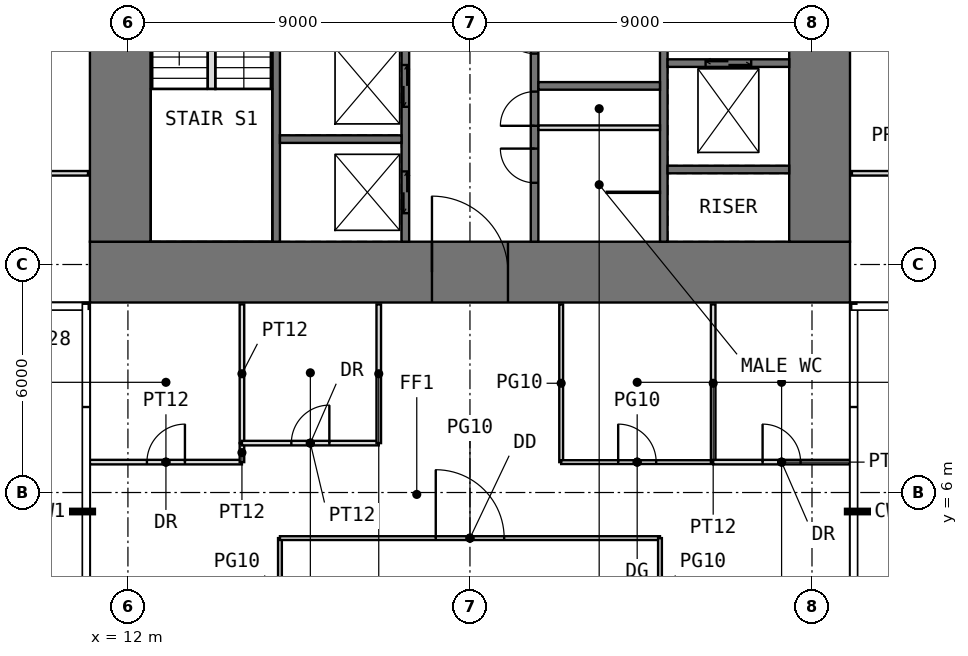
"""IFC4 building model, lengths in metres.
Left out: names, types, materials, properties, quantities, classifications, styles, units other than length and angle.
Written with IfcOpenShell. Run it as: python <this file> out.ifc"""

import sys

from ifc_helpers import new_model, si_unit, direction, frame, frame_2d, origin, place, context, subcontext, project, spatial, rectangle, extrude, element, fill, save


model = new_model("IFC4")
c1 = context("Model", 3, precision=1e-05, world=origin(), true_north=direction((0.0, 1.0)))
c2 = subcontext(c1, "Body", "Model", "MODEL_VIEW")
j1 = project(units=[si_unit("LENGTHUNIT", "METRE"), si_unit("PLANEANGLEUNIT", "RADIAN")], contexts=[c1])
p1 = place(None, origin())
s1 = spatial("IfcSite", under=j1, at=p1, CompositionType="ELEMENT")
p2 = place(p1, origin())
s2 = spatial("IfcBuilding", under=s1, at=p2, CompositionType="ELEMENT")
p3 = place(p2, frame((0.0, 0.0, 144.5)))
s3 = spatial("IfcBuildingStorey", under=s2, at=p3, CompositionType="ELEMENT", Elevation=144.5)
p4 = place(p3, frame((11.0, 11.8, -0.05), z_axis=(0.0, 0.0, 1.0), x_axis=(1.0, 0.0, 0.0)))
e1 = element("IfcWall", 1, at=p4, inside=s3, PredefinedType="SHEAR", context=c2, shape_type="SweptSolid", body=[
    extrude(rectangle(XDim=20.0, YDim=1.6, at=frame_2d((10.0, 0.0))), origin(), (0.0, 0.0, 1.0), 4.0),
])
p5 = place(p4, frame((9.0, 0.0, 0.05)))
e2 = element("IfcOpeningElement", 2, at=p5, cuts=e1, PredefinedType="OPENING", context=c2, shape_type="SweptSolid", body=[
    extrude(rectangle(XDim=2.0, YDim=2.2, at=frame_2d((1.0, 1.1))), frame((0.0, 0.81, 0.0), z_axis=(0.0, -1.0, 0.0), x_axis=(1.0, 0.0, 0.0)), (0.0, 0.0, 1.0), 1.62),
])
p6 = place(p3, frame((11.8, 12.6, -0.05), z_axis=(0.0, 0.0, 1.0), x_axis=(0.0, 1.0, 0.0)))
e3 = element("IfcWall", 3, at=p6, inside=s3, PredefinedType="SHEAR", context=c2, shape_type="SweptSolid", body=[
    extrude(rectangle(XDim=16.8, YDim=1.6, at=frame_2d((8.4, 0.0))), origin(), (0.0, 0.0, 1.0), 4.0),
])
p7 = place(p6, frame((9.9, 0.0, 0.05)))
e4 = element("IfcOpeningElement", 4, at=p7, cuts=e3, PredefinedType="OPENING", context=c2, shape_type="SweptSolid", body=[
    extrude(rectangle(XDim=1.0, YDim=2.2, at=frame_2d((0.5, 1.1))), frame((0.0, 0.81, 0.0), z_axis=(0.0, -1.0, 0.0), x_axis=(1.0, 0.0, 0.0)), (0.0, 0.0, 1.0), 1.62),
])
p8 = place(p3, frame((30.2, 12.6, -0.05), z_axis=(0.0, 0.0, 1.0), x_axis=(0.0, 1.0, 0.0)))
e5 = element("IfcWall", 5, at=p8, inside=s3, PredefinedType="SHEAR", context=c2, shape_type="SweptSolid", body=[
    extrude(rectangle(XDim=16.8, YDim=1.6, at=frame_2d((8.4, 0.0))), origin(), (0.0, 0.0, 1.0), 4.0),
])
p9 = place(p8, frame((5.9, 0.0, 0.05)))
e6 = element("IfcOpeningElement", 6, at=p9, cuts=e5, PredefinedType="OPENING", context=c2, shape_type="SweptSolid", body=[
    extrude(rectangle(XDim=1.0, YDim=2.2, at=frame_2d((0.5, 1.1))), frame((0.0, 0.81, 0.0), z_axis=(0.0, -1.0, 0.0), x_axis=(1.0, 0.0, 0.0)), (0.0, 0.0, 1.0), 1.62),
])
p10 = place(p3, frame((15.9, 12.6, -0.05), z_axis=(0.0, 0.0, 1.0), x_axis=(0.0, 1.0, 0.0)))
e7 = element("IfcWall", 7, at=p10, inside=s3, PredefinedType="SHEAR", context=c2, shape_type="SweptSolid", body=[
    extrude(rectangle(XDim=16.8, YDim=0.2, at=frame_2d((8.4, 0.0))), origin(), (0.0, 0.0, 1.0), 4.0),
])
p11 = place(p10, frame((8.9, 0.0, 0.05)))
e8 = element("IfcOpeningElement", 8, at=p11, cuts=e7, PredefinedType="OPENING", context=c2, shape_type="SweptSolid", body=[
    extrude(rectangle(XDim=1.0, YDim=2.2, at=frame_2d((0.5, 1.1))), frame((0.0, 0.11, 0.0), z_axis=(0.0, -1.0, 0.0), x_axis=(1.0, 0.0, 0.0)), (0.0, 0.0, 1.0), 0.22),
])
p12 = place(p3, frame((19.3, 12.6, -0.05), z_axis=(0.0, 0.0, 1.0), x_axis=(0.0, 1.0, 0.0)))
e9 = element("IfcWall", 9, at=p12, inside=s3, PredefinedType="SHEAR", context=c2, shape_type="SweptSolid", body=[
    extrude(rectangle(XDim=16.8, YDim=0.2, at=frame_2d((8.4, 0.0))), origin(), (0.0, 0.0, 1.0), 4.0),
])
p13 = place(p12, frame((8.7, 0.0, 0.05)))
e10 = element("IfcOpeningElement", 10, at=p13, cuts=e9, PredefinedType="OPENING", context=c2, shape_type="SweptSolid", body=[
    extrude(rectangle(XDim=1.0, YDim=2.2, at=frame_2d((0.5, 1.1))), frame((0.0, 0.11, 0.0), z_axis=(0.0, -1.0, 0.0), x_axis=(1.0, 0.0, 0.0)), (0.0, 0.0, 1.0), 0.22),
])
p14 = place(p12, frame((10.85, 0.0, 0.05)))
e11 = element("IfcOpeningElement", 11, at=p14, cuts=e9, PredefinedType="OPENING", context=c2, shape_type="SweptSolid", body=[
    extrude(rectangle(XDim=0.9, YDim=2.2, at=frame_2d((0.45, 1.1))), frame((0.0, 0.11, 0.0), z_axis=(0.0, -1.0, 0.0), x_axis=(1.0, 0.0, 0.0)), (0.0, 0.0, 1.0), 0.22),
])
p15 = place(p12, frame((13.3, 0.0, 0.05)))
e12 = element("IfcOpeningElement", 12, at=p15, cuts=e9, PredefinedType="OPENING", context=c2, shape_type="SweptSolid", body=[
    extrude(rectangle(XDim=1.0, YDim=2.2, at=frame_2d((0.5, 1.1))), frame((0.0, 0.11, 0.0), z_axis=(0.0, -1.0, 0.0), x_axis=(1.0, 0.0, 0.0)), (0.0, 0.0, 1.0), 0.22),
])
p16 = place(p12, frame((15.55, 0.0, 0.05)))
e13 = element("IfcOpeningElement", 13, at=p16, cuts=e9, PredefinedType="OPENING", context=c2, shape_type="SweptSolid", body=[
    extrude(rectangle(XDim=0.9, YDim=2.2, at=frame_2d((0.45, 1.1))), frame((0.0, 0.11, 0.0), z_axis=(0.0, -1.0, 0.0), x_axis=(1.0, 0.0, 0.0)), (0.0, 0.0, 1.0), 0.22),
])
p17 = place(p12, frame((0.75, 0.0, 0.05)))
e14 = element("IfcOpeningElement", 14, at=p17, cuts=e9, PredefinedType="OPENING", context=c2, shape_type="SweptSolid", body=[
    extrude(rectangle(XDim=1.1, YDim=2.2, at=frame_2d((0.55, 1.1))), frame((0.0, 0.11, 0.0), z_axis=(0.0, -1.0, 0.0), x_axis=(1.0, 0.0, 0.0)), (0.0, 0.0, 1.0), 0.22),
])
p18 = place(p12, frame((3.55, 0.0, 0.05)))
e15 = element("IfcOpeningElement", 15, at=p18, cuts=e9, PredefinedType="OPENING", context=c2, shape_type="SweptSolid", body=[
    extrude(rectangle(XDim=1.1, YDim=2.2, at=frame_2d((0.55, 1.1))), frame((0.0, 0.11, 0.0), z_axis=(0.0, -1.0, 0.0), x_axis=(1.0, 0.0, 0.0)), (0.0, 0.0, 1.0), 0.22),
])
p19 = place(p12, frame((6.35, 0.0, 0.05)))
e16 = element("IfcOpeningElement", 16, at=p19, cuts=e9, PredefinedType="OPENING", context=c2, shape_type="SweptSolid", body=[
    extrude(rectangle(XDim=1.1, YDim=2.2, at=frame_2d((0.55, 1.1))), frame((0.0, 0.11, 0.0), z_axis=(0.0, -1.0, 0.0), x_axis=(1.0, 0.0, 0.0)), (0.0, 0.0, 1.0), 0.22),
])
p20 = place(p3, frame((22.7, 12.6, -0.05), z_axis=(0.0, 0.0, 1.0), x_axis=(0.0, 1.0, 0.0)))
e17 = element("IfcWall", 17, at=p20, inside=s3, PredefinedType="SHEAR", context=c2, shape_type="SweptSolid", body=[
    extrude(rectangle(XDim=16.8, YDim=0.2, at=frame_2d((8.4, 0.0))), origin(), (0.0, 0.0, 1.0), 4.0),
])
p21 = place(p20, frame((3.05, 0.0, 0.05)))
e18 = element("IfcOpeningElement", 18, at=p21, cuts=e17, PredefinedType="OPENING", context=c2, shape_type="SweptSolid", body=[
    extrude(rectangle(XDim=0.9, YDim=2.2, at=frame_2d((0.45, 1.1))), frame((0.0, 0.11, 0.0), z_axis=(0.0, -1.0, 0.0), x_axis=(1.0, 0.0, 0.0)), (0.0, 0.0, 1.0), 0.22),
])
p22 = place(p20, frame((7.1, 0.0, 0.05)))
e19 = element("IfcOpeningElement", 19, at=p22, cuts=e17, PredefinedType="OPENING", context=c2, shape_type="SweptSolid", body=[
    extrude(rectangle(XDim=1.0, YDim=2.2, at=frame_2d((0.5, 1.1))), frame((0.0, 0.11, 0.0), z_axis=(0.0, -1.0, 0.0), x_axis=(1.0, 0.0, 0.0)), (0.0, 0.0, 1.0), 0.22),
])
p23 = place(p20, frame((1.55, 0.0, 0.05)))
e20 = element("IfcOpeningElement", 20, at=p23, cuts=e17, PredefinedType="OPENING", context=c2, shape_type="SweptSolid", body=[
    extrude(rectangle(XDim=0.9, YDim=2.2, at=frame_2d((0.45, 1.1))), frame((0.0, 0.11, 0.0), z_axis=(0.0, -1.0, 0.0), x_axis=(1.0, 0.0, 0.0)), (0.0, 0.0, 1.0), 0.22),
])
p24 = place(p20, frame((4.95, 0.0, 0.05)))
e21 = element("IfcOpeningElement", 21, at=p24, cuts=e17, PredefinedType="OPENING", context=c2, shape_type="SweptSolid", body=[
    extrude(rectangle(XDim=0.9, YDim=2.2, at=frame_2d((0.45, 1.1))), frame((0.0, 0.11, 0.0), z_axis=(0.0, -1.0, 0.0), x_axis=(1.0, 0.0, 0.0)), (0.0, 0.0, 1.0), 0.22),
])
p25 = place(p20, frame((9.4, 0.0, 0.05)))
e22 = element("IfcOpeningElement", 22, at=p25, cuts=e17, PredefinedType="OPENING", context=c2, shape_type="SweptSolid", body=[
    extrude(rectangle(XDim=1.0, YDim=2.2, at=frame_2d((0.5, 1.1))), frame((0.0, 0.11, 0.0), z_axis=(0.0, -1.0, 0.0), x_axis=(1.0, 0.0, 0.0)), (0.0, 0.0, 1.0), 0.22),
])
p26 = place(p3, frame((26.1, 12.6, -0.05), z_axis=(0.0, 0.0, 1.0), x_axis=(0.0, 1.0, 0.0)))
e23 = element("IfcWall", 23, at=p26, inside=s3, PredefinedType="SHEAR", context=c2, shape_type="SweptSolid", body=[
    extrude(rectangle(XDim=16.8, YDim=0.2, at=frame_2d((8.4, 0.0))), origin(), (0.0, 0.0, 1.0), 4.0),
])
p27 = place(p26, frame((6.9, 0.0, 0.05)))
e24 = element("IfcOpeningElement", 24, at=p27, cuts=e23, PredefinedType="OPENING", context=c2, shape_type="SweptSolid", body=[
    extrude(rectangle(XDim=1.0, YDim=2.2, at=frame_2d((0.5, 1.1))), frame((0.0, 0.11, 0.0), z_axis=(0.0, -1.0, 0.0), x_axis=(1.0, 0.0, 0.0)), (0.0, 0.0, 1.0), 0.22),
])
for number, where, z_axis, x_axis in (
    (25, (16.0, 15.3, -0.05), (0.0, 0.0, 1.0), (1.0, 0.0, 0.0)),
    (26, (22.8, 16.7, -0.05), (0.0, 0.0, 1.0), (1.0, 0.0, 0.0)),
    (27, (26.2, 14.5, -0.05), (0.0, 0.0, 1.0), (1.0, 0.0, 0.0)),
):
    element("IfcWall", number, at=place(p3, frame(where, z_axis=z_axis, x_axis=x_axis)), inside=s3, PredefinedType="SHEAR", context=c2, shape_type="SweptSolid", body=[
        extrude(rectangle(XDim=3.2, YDim=0.2, at=frame_2d((1.6, 0.0))), origin(), (0.0, 0.0, 1.0), 4.0),
    ])
p28 = place(p3, frame((26.2, 17.3, -0.05), z_axis=(0.0, 0.0, 1.0), x_axis=(1.0, 0.0, 0.0)))
e28 = element("IfcWall", 28, at=p28, inside=s3, PredefinedType="SHEAR", context=c2, shape_type="SweptSolid", body=[
    extrude(rectangle(XDim=3.2, YDim=0.2, at=frame_2d((1.6, 0.0))), origin(), (0.0, 0.0, 1.0), 4.0),
])
p29 = place(p28, frame((1.0, 0.0, 0.05)))
e29 = element("IfcOpeningElement", 29, at=p29, cuts=e28, PredefinedType="OPENING", context=c2, shape_type="SweptSolid", body=[
    extrude(rectangle(XDim=1.2, YDim=2.2, at=frame_2d((0.6, 1.1))), frame((0.0, 0.11, 0.0), z_axis=(0.0, -1.0, 0.0), x_axis=(1.0, 0.0, 0.0)), (0.0, 0.0, 1.0), 0.22),
])
p30 = place(p3, frame((22.8, 15.6, 0.0), z_axis=(0.0, 0.0, 1.0), x_axis=(1.0, 0.0, 0.0)))
e30 = element("IfcWall", 30, at=p30, inside=s3, PredefinedType="PARTITIONING", context=c2, shape_type="SweptSolid", body=[
    extrude(rectangle(XDim=3.2, YDim=0.12, at=frame_2d((1.6, 0.0))), origin(), (0.0, 0.0, 1.0), 3.75),
])
p31 = place(p3, frame((24.6, 13.9, 0.0), z_axis=(0.0, 0.0, 1.0), x_axis=(1.0, 0.0, 0.0)))
e31 = element("IfcWall", 31, at=p31, inside=s3, PredefinedType="PARTITIONING", context=c2, shape_type="SweptSolid", body=[
    extrude(rectangle(XDim=1.4, YDim=0.03, at=frame_2d((0.7, 0.0))), origin(), (0.0, 0.0, 1.0), 3.75),
])
p32 = place(p3, frame((6.8, 14.4, 0.0), z_axis=(0.0, 0.0, 1.0), x_axis=(1.0, 0.0, 0.0)))
e32 = element("IfcWall", 32, at=p32, inside=s3, PredefinedType="PARTITIONING", context=c2, shape_type="SweptSolid", body=[
    extrude(rectangle(XDim=4.15, YDim=0.12, at=frame_2d((2.075, 0.0))), origin(), (0.0, 0.0, 1.0), 3.75),
])
p33 = place(p3, frame((11.0, 6.8, 0.0), z_axis=(0.0, 0.0, 1.0), x_axis=(1.0, 0.0, 0.0)))
e33 = element("IfcWall", 33, at=p33, inside=s3, PredefinedType="PARTITIONING", context=c2, shape_type="SweptSolid", body=[
    extrude(rectangle(XDim=4.0, YDim=0.12, at=frame_2d((2.0, 0.0))), origin(), (0.0, 0.0, 1.0), 3.75),
])
p34 = place(p33, frame((1.5, 0.0, 0.0)))
e34 = element("IfcOpeningElement", 34, at=p34, cuts=e33, PredefinedType="OPENING", context=c2, shape_type="SweptSolid", body=[
    extrude(rectangle(XDim=1.0, YDim=2.2, at=frame_2d((0.5, 1.1))), frame((0.0, 0.07, 0.0), z_axis=(0.0, -1.0, 0.0), x_axis=(1.0, 0.0, 0.0)), (0.0, 0.0, 1.0), 0.14),
])
p35 = place(p3, frame((15.0, 6.8, 0.0), z_axis=(0.0, 0.0, 1.0), x_axis=(0.0, 1.0, 0.0)))
e35 = element("IfcWall", 35, at=p35, inside=s3, PredefinedType="PARTITIONING", context=c2, shape_type="SweptSolid", body=[
    extrude(rectangle(XDim=0.5, YDim=0.12, at=frame_2d((0.25, 0.0))), origin(), (0.0, 0.0, 1.0), 3.75),
])
p36 = place(p3, frame((15.0, 7.3, 0.0), z_axis=(0.0, 0.0, 1.0), x_axis=(0.0, 1.0, 0.0)))
e36 = element("IfcWall", 36, at=p36, inside=s3, PredefinedType="PARTITIONING", context=c2, shape_type="SweptSolid", body=[
    extrude(rectangle(XDim=3.65, YDim=0.12, at=frame_2d((1.825, 0.0))), origin(), (0.0, 0.0, 1.0), 3.75),
])
p37 = place(p3, frame((15.0, 7.3, 0.0), z_axis=(0.0, 0.0, 1.0), x_axis=(1.0, 0.0, 0.0)))
e37 = element("IfcWall", 37, at=p37, inside=s3, PredefinedType="PARTITIONING", context=c2, shape_type="SweptSolid", body=[
    extrude(rectangle(XDim=3.6, YDim=0.12, at=frame_2d((1.8, 0.0))), origin(), (0.0, 0.0, 1.0), 3.75),
])
p38 = place(p37, frame((1.3, 0.0, 0.0)))
e38 = element("IfcOpeningElement", 38, at=p38, cuts=e37, PredefinedType="OPENING", context=c2, shape_type="SweptSolid", body=[
    extrude(rectangle(XDim=1.0, YDim=2.2, at=frame_2d((0.5, 1.1))), frame((0.0, 0.07, 0.0), z_axis=(0.0, -1.0, 0.0), x_axis=(1.0, 0.0, 0.0)), (0.0, 0.0, 1.0), 0.14),
])
p39 = place(p3, frame((16.0, 1.26, 0.0), z_axis=(0.0, 0.0, 1.0), x_axis=(0.0, 1.0, 0.0)))
e39 = element("IfcWall", 39, at=p39, inside=s3, PredefinedType="PARTITIONING", context=c2, shape_type="SweptSolid", body=[
    extrude(rectangle(XDim=3.54, YDim=0.1, at=frame_2d((1.77, 0.0))), origin(), (0.0, 0.0, 1.0), 3.75),
])
p40 = place(p3, frame((16.0, 4.8, 0.0), z_axis=(0.0, 0.0, 1.0), x_axis=(1.0, 0.0, 0.0)))
e40 = element("IfcWall", 40, at=p40, inside=s3, PredefinedType="PARTITIONING", context=c2, shape_type="SweptSolid", body=[
    extrude(rectangle(XDim=10.0, YDim=0.1, at=frame_2d((5.0, 0.0))), origin(), (0.0, 0.0, 1.0), 3.75),
])
p41 = place(p40, frame((4.1, 0.0, 0.0)))
e41 = element("IfcOpeningElement", 41, at=p41, cuts=e40, PredefinedType="OPENING", context=c2, shape_type="SweptSolid", body=[
    extrude(rectangle(XDim=1.8, YDim=2.4, at=frame_2d((0.9, 1.2))), frame((0.0, 0.06, 0.0), z_axis=(0.0, -1.0, 0.0), x_axis=(1.0, 0.0, 0.0)), (0.0, 0.0, 1.0), 0.12),
])
p42 = place(p3, frame((18.6, 7.3, 0.0), z_axis=(0.0, 0.0, 1.0), x_axis=(0.0, 1.0, 0.0)))
e42 = element("IfcWall", 42, at=p42, inside=s3, PredefinedType="PARTITIONING", context=c2, shape_type="SweptSolid", body=[
    extrude(rectangle(XDim=3.65, YDim=0.12, at=frame_2d((1.825, 0.0))), origin(), (0.0, 0.0, 1.0), 3.75),
])
p43 = place(p3, frame((23.4, 6.8, 0.0), z_axis=(0.0, 0.0, 1.0), x_axis=(0.0, 1.0, 0.0)))
e43 = element("IfcWall", 43, at=p43, inside=s3, PredefinedType="PARTITIONING", context=c2, shape_type="SweptSolid", body=[
    extrude(rectangle(XDim=4.15, YDim=0.1, at=frame_2d((2.075, 0.0))), origin(), (0.0, 0.0, 1.0), 3.75),
])
p44 = place(p3, frame((23.4, 6.8, 0.0), z_axis=(0.0, 0.0, 1.0), x_axis=(1.0, 0.0, 0.0)))
e44 = element("IfcWall", 44, at=p44, inside=s3, PredefinedType="PARTITIONING", context=c2, shape_type="SweptSolid", body=[
    extrude(rectangle(XDim=4.0, YDim=0.1, at=frame_2d((2.0, 0.0))), origin(), (0.0, 0.0, 1.0), 3.75),
])
p45 = place(p44, frame((1.5, 0.0, 0.0)))
e45 = element("IfcOpeningElement", 45, at=p45, cuts=e44, PredefinedType="OPENING", context=c2, shape_type="SweptSolid", body=[
    extrude(rectangle(XDim=1.0, YDim=2.4, at=frame_2d((0.5, 1.2))), frame((0.0, 0.06, 0.0), z_axis=(0.0, -1.0, 0.0), x_axis=(1.0, 0.0, 0.0)), (0.0, 0.0, 1.0), 0.12),
])
p46 = place(p3, frame((26.0, 1.26, 0.0), z_axis=(0.0, 0.0, 1.0), x_axis=(0.0, 1.0, 0.0)))
e46 = element("IfcWall", 46, at=p46, inside=s3, PredefinedType="PARTITIONING", context=c2, shape_type="SweptSolid", body=[
    extrude(rectangle(XDim=3.54, YDim=0.1, at=frame_2d((1.77, 0.0))), origin(), (0.0, 0.0, 1.0), 3.75),
])
p47 = place(p3, frame((27.4, 6.8, 0.0), z_axis=(0.0, 0.0, 1.0), x_axis=(0.0, 1.0, 0.0)))
e47 = element("IfcWall", 47, at=p47, inside=s3, PredefinedType="PARTITIONING", context=c2, shape_type="SweptSolid", body=[
    extrude(rectangle(XDim=4.15, YDim=0.12, at=frame_2d((2.075, 0.0))), origin(), (0.0, 0.0, 1.0), 3.75),
])
p48 = place(p3, frame((27.4, 6.8, 0.0), z_axis=(0.0, 0.0, 1.0), x_axis=(1.0, 0.0, 0.0)))
e48 = element("IfcWall", 48, at=p48, inside=s3, PredefinedType="PARTITIONING", context=c2, shape_type="SweptSolid", body=[
    extrude(rectangle(XDim=3.6, YDim=0.12, at=frame_2d((1.8, 0.0))), origin(), (0.0, 0.0, 1.0), 3.75),
])
p49 = place(p48, frame((1.3, 0.0, 0.0)))
e49 = element("IfcOpeningElement", 49, at=p49, cuts=e48, PredefinedType="OPENING", context=c2, shape_type="SweptSolid", body=[
    extrude(rectangle(XDim=1.0, YDim=2.2, at=frame_2d((0.5, 1.1))), frame((0.0, 0.07, 0.0), z_axis=(0.0, -1.0, 0.0), x_axis=(1.0, 0.0, 0.0)), (0.0, 0.0, 1.0), 0.14),
])
p50 = place(p3, frame((31.05, 14.4, 0.0), z_axis=(0.0, 0.0, 1.0), x_axis=(1.0, 0.0, 0.0)))
e50 = element("IfcWall", 50, at=p50, inside=s3, PredefinedType="PARTITIONING", context=c2, shape_type="SweptSolid", body=[
    extrude(rectangle(XDim=3.65, YDim=0.12, at=frame_2d((1.825, 0.0))), origin(), (0.0, 0.0, 1.0), 3.75),
])
p51 = place(p3, frame((14.2, 16.62, 0.0), z_axis=(0.0, 0.0, 1.0), x_axis=(0.0, 1.0, 0.0)))
e51 = element("IfcWall", 51, at=p51, inside=s3, PredefinedType="PARTITIONING", context=c2, shape_type="SweptSolid", body=[
    extrude(rectangle(XDim=3.08, YDim=0.2, at=frame_2d((1.54, 0.0))), origin(), (0.0, 0.0, 1.0), 4.0),
])
p52 = place(p5, origin())
e52 = element("IfcDoor", 52, at=p52, inside=s3, OperationType="DOUBLE_DOOR_SINGLE_SWING", PredefinedType="DOOR", context=c2, shape_type="SweptSolid", body=[
    extrude(rectangle(XDim=2.0, YDim=2.2, at=frame_2d((1.0, 1.1))), frame((0.0, 0.025, 0.0), z_axis=(0.0, -1.0, 0.0), x_axis=(1.0, 0.0, 0.0)), (0.0, 0.0, 1.0), 0.05),
])
fill(e2, e52)
p53 = place(p21, origin())
e53 = element("IfcDoor", 53, at=p53, inside=s3, OperationType="SINGLE_SWING_LEFT", PredefinedType="DOOR", context=c2, shape_type="SweptSolid", body=[
    extrude(rectangle(XDim=0.9, YDim=2.2, at=frame_2d((0.45, 1.1))), frame((0.0, 0.025, 0.0), z_axis=(0.0, -1.0, 0.0), x_axis=(1.0, 0.0, 0.0)), (0.0, 0.0, 1.0), 0.05),
])
fill(e18, e53)
p54 = place(p23, origin())
e54 = element("IfcDoor", 54, at=p54, inside=s3, OperationType="SINGLE_SWING_RIGHT", PredefinedType="DOOR", context=c2, shape_type="SweptSolid", body=[
    extrude(rectangle(XDim=0.9, YDim=2.2, at=frame_2d((0.45, 1.1))), frame((0.0, 0.025, 0.0), z_axis=(0.0, -1.0, 0.0), x_axis=(1.0, 0.0, 0.0)), (0.0, 0.0, 1.0), 0.05),
])
fill(e20, e54)
p55 = place(p24, origin())
e55 = element("IfcDoor", 55, at=p55, inside=s3, OperationType="SINGLE_SWING_RIGHT", PredefinedType="DOOR", context=c2, shape_type="SweptSolid", body=[
    extrude(rectangle(XDim=0.9, YDim=2.2, at=frame_2d((0.45, 1.1))), frame((0.0, 0.025, 0.0), z_axis=(0.0, -1.0, 0.0), x_axis=(1.0, 0.0, 0.0)), (0.0, 0.0, 1.0), 0.05),
])
fill(e21, e55)
p56 = place(p34, origin())
e56 = element("IfcDoor", 56, at=p56, inside=s3, OperationType="SINGLE_SWING_RIGHT", PredefinedType="DOOR", context=c2, shape_type="SweptSolid", body=[
    extrude(rectangle(XDim=1.0, YDim=2.2, at=frame_2d((0.5, 1.1))), frame((0.0, 0.025, 0.0), z_axis=(0.0, -1.0, 0.0), x_axis=(1.0, 0.0, 0.0)), (0.0, 0.0, 1.0), 0.05),
])
fill(e34, e56)
p57 = place(p38, origin())
e57 = element("IfcDoor", 57, at=p57, inside=s3, OperationType="SINGLE_SWING_RIGHT", PredefinedType="DOOR", context=c2, shape_type="SweptSolid", body=[
    extrude(rectangle(XDim=1.0, YDim=2.2, at=frame_2d((0.5, 1.1))), frame((0.0, 0.025, 0.0), z_axis=(0.0, -1.0, 0.0), x_axis=(1.0, 0.0, 0.0)), (0.0, 0.0, 1.0), 0.05),
])
fill(e38, e57)
p58 = place(p45, origin())
e58 = element("IfcDoor", 58, at=p58, inside=s3, OperationType="SINGLE_SWING_LEFT", PredefinedType="DOOR", context=c2, shape_type="SweptSolid", body=[
    extrude(rectangle(XDim=1.0, YDim=2.4, at=frame_2d((0.5, 1.2))), frame((0.0, 0.025, 0.0), z_axis=(0.0, -1.0, 0.0), x_axis=(1.0, 0.0, 0.0)), (0.0, 0.0, 1.0), 0.05),
])
fill(e45, e58)
p59 = place(p49, origin())
e59 = element("IfcDoor", 59, at=p59, inside=s3, OperationType="SINGLE_SWING_LEFT", PredefinedType="DOOR", context=c2, shape_type="SweptSolid", body=[
    extrude(rectangle(XDim=1.0, YDim=2.2, at=frame_2d((0.5, 1.1))), frame((0.0, 0.025, 0.0), z_axis=(0.0, -1.0, 0.0), x_axis=(1.0, 0.0, 0.0)), (0.0, 0.0, 1.0), 0.05),
])
fill(e49, e59)
p60 = place(p41, origin())
e60 = element("IfcDoor", 60, at=p60, inside=s3, OperationType="DOUBLE_DOOR_SINGLE_SWING", PredefinedType="DOOR", context=c2, shape_type="SweptSolid", body=[
    extrude(rectangle(XDim=1.8, YDim=2.4, at=frame_2d((0.9, 1.2))), frame((0.0, 0.025, 0.0), z_axis=(0.0, -1.0, 0.0), x_axis=(1.0, 0.0, 0.0)), (0.0, 0.0, 1.0), 0.05),
])
fill(e41, e60)
p61 = place(p17, origin())
e61 = element("IfcDoor", 61, at=p61, inside=s3, OperationType="DOUBLE_DOOR_SLIDING", PredefinedType="DOOR", context=c2, shape_type="SweptSolid", body=[
    extrude(rectangle(XDim=1.1, YDim=2.2, at=frame_2d((0.55, 1.1))), frame((0.0, 0.025, 0.0), z_axis=(0.0, -1.0, 0.0), x_axis=(1.0, 0.0, 0.0)), (0.0, 0.0, 1.0), 0.05),
])
fill(e14, e61)
p62 = place(p18, origin())
e62 = element("IfcDoor", 62, at=p62, inside=s3, OperationType="DOUBLE_DOOR_SLIDING", PredefinedType="DOOR", context=c2, shape_type="SweptSolid", body=[
    extrude(rectangle(XDim=1.1, YDim=2.2, at=frame_2d((0.55, 1.1))), frame((0.0, 0.025, 0.0), z_axis=(0.0, -1.0, 0.0), x_axis=(1.0, 0.0, 0.0)), (0.0, 0.0, 1.0), 0.05),
])
fill(e15, e62)
p63 = place(p29, origin())
e63 = element("IfcDoor", 63, at=p63, inside=s3, OperationType="DOUBLE_DOOR_SLIDING", PredefinedType="DOOR", context=c2, shape_type="SweptSolid", body=[
    extrude(rectangle(XDim=1.2, YDim=2.2, at=frame_2d((0.6, 1.1))), frame((0.0, 0.025, 0.0), z_axis=(0.0, -1.0, 0.0), x_axis=(1.0, 0.0, 0.0)), (0.0, 0.0, 1.0), 0.05),
])
fill(e29, e63)
save(model, sys.argv[1])
